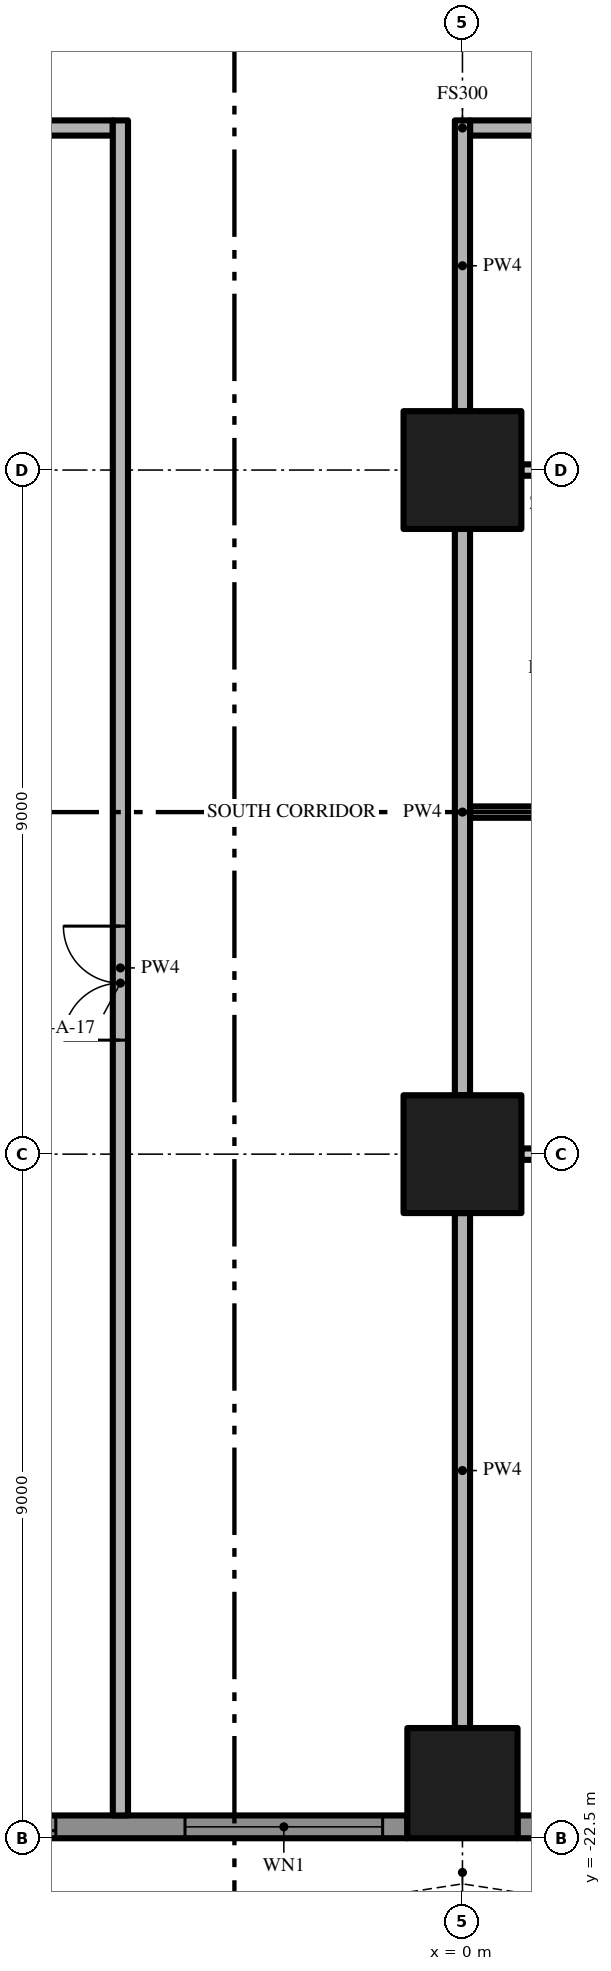
"""IFC4 building model, lengths in metres.
Left out: names, types, materials, properties, quantities, classifications, styles, units other than length and angle.
Written with IfcOpenShell. Run it as: python <this file> out.ifc"""

import sys

from ifc_helpers import new_model, si_unit, direction, frame, frame_2d, origin, origin_2d, place, context, subcontext, project, spatial, polyline, rectangle, outline, extrude, element, fill, save


model = new_model("IFC4")
c1 = context("Model", 3, precision=1e-05, world=origin(), true_north=direction((0.0, 1.0)))
c2 = subcontext(c1, "Body", "Model", "MODEL_VIEW")
j1 = project(units=[si_unit("LENGTHUNIT", "METRE"), si_unit("PLANEANGLEUNIT", "RADIAN")], contexts=[c1])
p1 = place(None, origin())
s1 = spatial("IfcSite", under=j1, at=p1, CompositionType="ELEMENT")
p2 = place(p1, origin())
s2 = spatial("IfcBuilding", under=s1, at=p2, CompositionType="ELEMENT")
p3 = place(p2, frame((0.0, 0.0, 22.6)))
s3 = spatial("IfcBuildingStorey", under=s2, at=p3, CompositionType="ELEMENT", Elevation=22.6)
p4 = place(p3, frame((0.0, -13.5, 0.0), z_axis=(0.0, 0.0, 1.0), x_axis=(1.0, 0.0, 0.0)))
e1 = element("IfcColumn", 1, at=p4, inside=s3, PredefinedType="COLUMN", context=c2, shape_type="SweptSolid", body=[
    extrude(rectangle(XDim=1.55, YDim=1.55, at=origin_2d()), origin(), (0.0, 0.0, 1.0), 3.5),
])
p5 = place(p3, frame((0.0, -21.775, 0.0), z_axis=(0.0, 0.0, 1.0), x_axis=(1.0, 0.0, 0.0)))
e2 = element("IfcColumn", 2, at=p5, inside=s3, PredefinedType="COLUMN", context=c2, shape_type="SweptSolid", body=[
    extrude(rectangle(XDim=1.45, YDim=1.45, at=origin_2d()), origin(), (0.0, 0.0, 1.0), 3.5),
])
p6 = place(p3, frame((0.0, -4.5, 0.0), z_axis=(0.0, 0.0, 1.0), x_axis=(1.0, 0.0, 0.0)))
e3 = element("IfcColumn", 3, at=p6, inside=s3, PredefinedType="COLUMN", context=c2, shape_type="SweptSolid", body=[
    extrude(rectangle(XDim=1.55, YDim=1.55, at=origin_2d()), origin(), (0.0, 0.0, 1.0), 3.5),
])
p7 = place(p3, frame((-0.725, -22.35, 0.0), z_axis=(0.0, 0.0, 1.0), x_axis=(-1.0, 0.0, 0.0)))
e4 = element("IfcWall", 4, at=p7, inside=s3, PredefinedType="SOLIDWALL", context=c2, shape_type="SweptSolid", body=[
    extrude(rectangle(XDim=7.55, YDim=0.3, at=frame_2d((3.775, 0.0))), origin(), (0.0, 0.0, 1.0), 3.5),
])
p8 = place(p7, frame((4.625, 0.0, 0.0)))
e5 = element("IfcOpeningElement", 5, at=p8, cuts=e4, PredefinedType="OPENING", context=c2, shape_type="SweptSolid", body=[
    extrude(rectangle(XDim=2.6, YDim=2.4, at=frame_2d((1.3, 1.2))), frame((0.0, 0.16, 0.0), z_axis=(0.0, -1.0, 0.0), x_axis=(1.0, 0.0, 0.0)), (0.0, 0.0, 1.0), 0.32),
])
p9 = place(p7, frame((0.325, 0.0, 0.45)))
e6 = element("IfcOpeningElement", 6, at=p9, cuts=e4, PredefinedType="OPENING", context=c2, shape_type="SweptSolid", body=[
    extrude(rectangle(XDim=2.6, YDim=2.65, at=frame_2d((1.3, 1.325))), frame((0.0, 0.16, 0.0), z_axis=(0.0, -1.0, 0.0), x_axis=(1.0, 0.0, 0.0)), (0.0, 0.0, 1.0), 0.32),
])
p10 = place(p3, frame((8.275, -22.35, 0.0), z_axis=(0.0, 0.0, 1.0), x_axis=(-1.0, 0.0, 0.0)))
e7 = element("IfcWall", 7, at=p10, inside=s3, PredefinedType="SOLIDWALL", context=c2, shape_type="SweptSolid", body=[
    extrude(rectangle(XDim=7.55, YDim=0.3, at=frame_2d((3.775, 0.0))), origin(), (0.0, 0.0, 1.0), 3.5),
])
p11 = place(p10, frame((4.625, 0.0, 0.45)))
e8 = element("IfcOpeningElement", 8, at=p11, cuts=e7, PredefinedType="OPENING", context=c2, shape_type="SweptSolid", body=[
    extrude(rectangle(XDim=2.6, YDim=2.65, at=frame_2d((1.3, 1.325))), frame((0.0, 0.16, 0.0), z_axis=(0.0, -1.0, 0.0), x_axis=(1.0, 0.0, 0.0)), (0.0, 0.0, 1.0), 0.32),
])
p12 = place(p10, frame((0.325, 0.0, 0.0)))
e9 = element("IfcOpeningElement", 9, at=p12, cuts=e7, PredefinedType="OPENING", context=c2, shape_type="SweptSolid", body=[
    extrude(rectangle(XDim=2.6, YDim=2.4, at=frame_2d((1.3, 1.2))), frame((0.0, 0.16, 0.0), z_axis=(0.0, -1.0, 0.0), x_axis=(1.0, 0.0, 0.0)), (0.0, 0.0, 1.0), 0.32),
])
p13 = place(p3, origin())
e10 = element("IfcWall", 10, at=p13, inside=s3, PredefinedType="USERDEFINED", context=c2, shape_type="SweptSolid", body=[
    extrude(outline(polyline([(-22.5, -25.5), (-21.0, -25.271), (-19.5, -24.671), (-18.0, -23.929), (-16.5, -23.329), (-15.0, -23.1), (-13.5, -23.329), (-12.0, -23.929), (-10.5, -24.671), (-9.0, -25.271), (-7.5, -25.5), (-6.0, -25.271), (-4.5, -24.671), (-3.0, -23.929), (-1.5, -23.329), (0.0, -23.1), (1.5, -23.329), (3.0, -23.929), (4.5, -24.671), (6.0, -25.271), (7.5, -25.5), (9.0, -25.271), (10.5, -24.671), (12.0, -23.929), (13.5, -23.329), (15.0, -23.1), (16.5, -23.329), (18.0, -23.929), (19.5, -24.671), (21.0, -25.271), (22.5, -25.5), (22.538, -25.253), (21.066, -25.028), (19.602, -24.442), (18.102, -23.701), (16.566, -23.086), (15.0, -22.847), (13.434, -23.086), (11.898, -23.701), (10.398, -24.442), (8.934, -25.028), (7.5, -25.247), (6.066, -25.028), (4.602, -24.442), (3.102, -23.701), (1.566, -23.086), (0.0, -22.847), (-1.566, -23.086), (-3.102, -23.701), (-4.602, -24.442), (-6.066, -25.028), (-7.5, -25.247), (-8.934, -25.028), (-10.398, -24.442), (-11.898, -23.701), (-13.434, -23.086), (-15.0, -22.847), (-16.566, -23.086), (-18.102, -23.701), (-19.602, -24.442), (-21.066, -25.028), (-22.538, -25.253), (-22.5, -25.5)])), origin(), (0.0, 0.0, 1.0), 0.9),
])
p14 = place(p3, frame((8.225, -13.5, 0.0), z_axis=(0.0, 0.0, 1.0), x_axis=(-1.0, 0.0, 0.0)))
e11 = element("IfcWall", 11, at=p14, inside=s3, PredefinedType="PARTITIONING", context=c2, shape_type="SweptSolid", body=[
    extrude(rectangle(XDim=7.45, YDim=0.15, at=frame_2d((3.725, 0.0))), origin(), (0.0, 0.0, 1.0), 3.5),
])
p15 = place(p14, frame((6.3, 0.0, 0.0)))
e12 = element("IfcOpeningElement", 12, at=p15, cuts=e11, PredefinedType="OPENING", context=c2, shape_type="SweptSolid", body=[
    extrude(rectangle(XDim=1.0, YDim=2.4, at=frame_2d((0.5, 1.2))), frame((0.0, 0.085, 0.0), z_axis=(0.0, -1.0, 0.0), x_axis=(1.0, 0.0, 0.0)), (0.0, 0.0, 1.0), 0.17),
])
p16 = place(p14, frame((0.15, 0.0, 0.0)))
e13 = element("IfcOpeningElement", 13, at=p16, cuts=e11, PredefinedType="OPENING", context=c2, shape_type="SweptSolid", body=[
    extrude(rectangle(XDim=1.0, YDim=2.4, at=frame_2d((0.5, 1.2))), frame((0.0, 0.085, 0.0), z_axis=(0.0, -1.0, 0.0), x_axis=(1.0, 0.0, 0.0)), (0.0, 0.0, 1.0), 0.17),
])
p17 = place(p3, frame((0.1, -9.0, 0.0), z_axis=(0.0, 0.0, 1.0), x_axis=(1.0, 0.0, 0.0)))
e14 = element("IfcWall", 14, at=p17, inside=s3, PredefinedType="PARTITIONING", context=c2, shape_type="SweptSolid", body=[
    extrude(rectangle(XDim=13.775, YDim=0.15, at=frame_2d((6.888, 0.0))), origin(), (0.0, 0.0, 1.0), 3.5),
])
p18 = place(p17, frame((8.1, 0.0, 0.0)))
e15 = element("IfcOpeningElement", 15, at=p18, cuts=e14, PredefinedType="OPENING", context=c2, shape_type="SweptSolid", body=[
    extrude(rectangle(XDim=1.0, YDim=2.4, at=frame_2d((0.5, 1.2))), frame((0.0, 0.085, 0.0), z_axis=(0.0, -1.0, 0.0), x_axis=(1.0, 0.0, 0.0)), (0.0, 0.0, 1.0), 0.17),
])
p19 = place(p3, frame((8.225, -4.5, 0.0), z_axis=(0.0, 0.0, 1.0), x_axis=(-1.0, 0.0, 0.0)))
e16 = element("IfcWall", 16, at=p19, inside=s3, PredefinedType="PARTITIONING", context=c2, shape_type="SweptSolid", body=[
    extrude(rectangle(XDim=7.45, YDim=0.15, at=frame_2d((3.725, 0.0))), origin(), (0.0, 0.0, 1.0), 3.5),
])
p20 = place(p19, frame((6.5, 0.0, 0.0)))
e17 = element("IfcOpeningElement", 17, at=p20, cuts=e16, PredefinedType="OPENING", context=c2, shape_type="SweptSolid", body=[
    extrude(rectangle(XDim=0.8, YDim=2.0, at=frame_2d((0.4, 1.0))), frame((0.0, 0.085, 0.0), z_axis=(0.0, -1.0, 0.0), x_axis=(1.0, 0.0, 0.0)), (0.0, 0.0, 1.0), 0.17),
])
p21 = place(p19, frame((3.625, 0.0, 0.0)))
e18 = element("IfcOpeningElement", 18, at=p21, cuts=e16, PredefinedType="OPENING", context=c2, shape_type="SweptSolid", body=[
    extrude(rectangle(XDim=0.8, YDim=2.0, at=frame_2d((0.4, 1.0))), frame((0.0, 0.085, 0.0), z_axis=(0.0, -1.0, 0.0), x_axis=(1.0, 0.0, 0.0)), (0.0, 0.0, 1.0), 0.17),
])
p22 = place(p3, frame((-17.4, 0.0, 0.0), z_axis=(0.0, 0.0, 1.0), x_axis=(1.0, 0.0, 0.0)))
e19 = element("IfcWall", 19, at=p22, inside=s3, PredefinedType="PARTITIONING", context=c2, shape_type="SweptSolid", body=[
    extrude(rectangle(XDim=12.8, YDim=0.2, at=frame_2d((6.4, 0.0))), origin(), (0.0, 0.0, 1.0), 3.5),
])
p23 = place(p3, frame((17.4, 0.0, 0.0), z_axis=(0.0, 0.0, 1.0), x_axis=(-1.0, 0.0, 0.0)))
e20 = element("IfcWall", 20, at=p23, inside=s3, PredefinedType="PARTITIONING", context=c2, shape_type="SweptSolid", body=[
    extrude(rectangle(XDim=17.3, YDim=0.2, at=frame_2d((8.65, 0.0))), origin(), (0.0, 0.0, 1.0), 3.5),
])
p24 = place(p23, frame((7.65, 0.0, 0.0)))
e21 = element("IfcOpeningElement", 21, at=p24, cuts=e20, PredefinedType="OPENING", context=c2, shape_type="SweptSolid", body=[
    extrude(rectangle(XDim=1.5, YDim=2.4, at=frame_2d((0.75, 1.2))), frame((0.0, 0.11, 0.0), z_axis=(0.0, -1.0, 0.0), x_axis=(1.0, 0.0, 0.0)), (0.0, 0.0, 1.0), 0.22),
])
p25 = place(p3, frame((-4.5, -22.2, 0.0), z_axis=(0.0, 0.0, 1.0), x_axis=(0.0, 1.0, 0.0)))
e22 = element("IfcWall", 22, at=p25, inside=s3, PredefinedType="PARTITIONING", context=c2, shape_type="SweptSolid", body=[
    extrude(rectangle(XDim=22.3, YDim=0.2, at=frame_2d((11.15, 0.0))), origin(), (0.0, 0.0, 1.0), 3.5),
])
p26 = place(p25, frame((10.2, 0.0, 0.0)))
e23 = element("IfcOpeningElement", 23, at=p26, cuts=e22, PredefinedType="OPENING", context=c2, shape_type="SweptSolid", body=[
    extrude(rectangle(XDim=1.5, YDim=2.4, at=frame_2d((0.75, 1.2))), frame((0.0, 0.11, 0.0), z_axis=(0.0, -1.0, 0.0), x_axis=(1.0, 0.0, 0.0)), (0.0, 0.0, 1.0), 0.22),
])
p27 = place(p3, frame((0.0, -21.05, 0.0), z_axis=(0.0, 0.0, 1.0), x_axis=(0.0, 1.0, 0.0)))
e24 = element("IfcWall", 24, at=p27, inside=s3, PredefinedType="PARTITIONING", context=c2, shape_type="SweptSolid", body=[
    extrude(rectangle(XDim=6.775, YDim=0.2, at=frame_2d((3.388, 0.0))), origin(), (0.0, 0.0, 1.0), 3.5),
])
p28 = place(p3, frame((0.0, -12.725, 0.0), z_axis=(0.0, 0.0, 1.0), x_axis=(0.0, 1.0, 0.0)))
e25 = element("IfcWall", 25, at=p28, inside=s3, PredefinedType="PARTITIONING", context=c2, shape_type="SweptSolid", body=[
    extrude(rectangle(XDim=7.45, YDim=0.2, at=frame_2d((3.725, 0.0))), origin(), (0.0, 0.0, 1.0), 3.5),
])
p29 = place(p3, frame((0.0, -3.725, 0.0), z_axis=(0.0, 0.0, 1.0), x_axis=(0.0, 1.0, 0.0)))
e26 = element("IfcWall", 26, at=p29, inside=s3, PredefinedType="PARTITIONING", context=c2, shape_type="SweptSolid", body=[
    extrude(rectangle(XDim=3.825, YDim=0.2, at=frame_2d((1.913, 0.0))), origin(), (0.0, 0.0, 1.0), 3.5),
])
p30 = place(p8, origin())
e27 = element("IfcDoor", 27, at=p30, inside=s3, OperationType="SINGLE_SWING_LEFT", PredefinedType="DOOR", context=c2, shape_type="SweptSolid", body=[
    extrude(rectangle(XDim=2.6, YDim=2.4, at=frame_2d((1.3, 1.2))), frame((0.0, 0.025, 0.0), z_axis=(0.0, -1.0, 0.0), x_axis=(1.0, 0.0, 0.0)), (0.0, 0.0, 1.0), 0.05),
])
fill(e5, e27)
p31 = place(p9, origin())
e28 = element("IfcWindow", 28, at=p31, inside=s3, PartitioningType="SINGLE_PANEL", PredefinedType="WINDOW", context=c2, shape_type="SweptSolid", body=[
    extrude(rectangle(XDim=2.6, YDim=2.65, at=frame_2d((1.3, 1.325))), frame((0.0, 0.03, 0.0), z_axis=(0.0, -1.0, 0.0), x_axis=(1.0, 0.0, 0.0)), (0.0, 0.0, 1.0), 0.06),
])
fill(e6, e28)
p32 = place(p26, origin())
e29 = element("IfcDoor", 29, at=p32, inside=s3, OperationType="DOUBLE_DOOR_SINGLE_SWING", PredefinedType="DOOR", context=c2, shape_type="SweptSolid", body=[
    extrude(rectangle(XDim=1.5, YDim=2.4, at=frame_2d((0.75, 1.2))), frame((0.0, 0.025, 0.0), z_axis=(0.0, -1.0, 0.0), x_axis=(1.0, 0.0, 0.0)), (0.0, 0.0, 1.0), 0.05),
])
fill(e23, e29)
save(model, sys.argv[1])
